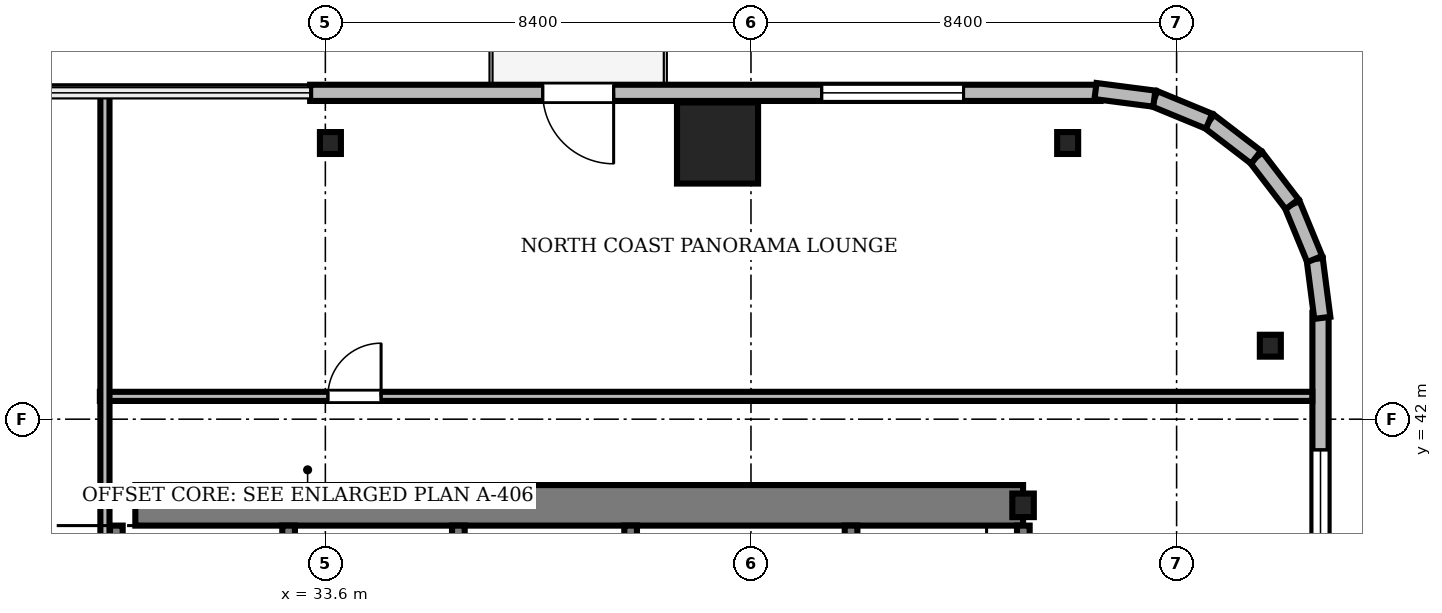
"""IFC4 building model, lengths in metres.
Left out: names, types, materials, properties, quantities, classifications, styles, units other than length and angle.
Written with IfcOpenShell. Run it as: python <this file> out.ifc"""

import sys

from ifc_helpers import new_model, si_unit, direction, frame, frame_2d, origin, origin_2d, place, context, subcontext, project, spatial, rectangle, i_section, extrude, source, transform, mapped, element, fill, save


model = new_model("IFC4")
c1 = context("Model", 3, precision=1e-05, world=origin(), true_north=direction((0.0, 1.0)))
c2 = subcontext(c1, "Body", "Model", "MODEL_VIEW")
j1 = project(units=[si_unit("LENGTHUNIT", "METRE"), si_unit("PLANEANGLEUNIT", "RADIAN")], contexts=[c1])
p1 = place(None, origin())
s1 = spatial("IfcSite", under=j1, at=p1, CompositionType="ELEMENT")
p2 = place(p1, origin())
s2 = spatial("IfcBuilding", under=s1, at=p2, CompositionType="ELEMENT")
p3 = place(p2, frame((0.0, 0.0, 126.1)))
s3 = spatial("IfcBuildingStorey", under=s2, at=p3, CompositionType="ELEMENT", Elevation=126.1)
m1 = source(origin(), c2, "Body", "SweptSolid", [
    extrude(rectangle(XDim=17.52, YDim=0.8, at=frame_2d((8.76, 0.0))), origin(), (0.0, 0.0, 1.0), 3.46),
])
p4 = place(p3, frame((29.85, 40.3, 0.0), z_axis=(0.0, 0.0, 1.0), x_axis=(1.0, 0.0, 0.0)))
e1 = element("IfcWall", 1, at=p4, inside=s3, PredefinedType="SHEAR", context=c2, shape_type="MappedRepresentation", body=[
    mapped(m1, transform((0.0, 0.0, 0.0), scale=1.0)),
])
m2 = source(origin(), c2, "Body", "SweptSolid", [
    extrude(i_section(OverallWidth=0.424, OverallDepth=0.465, WebThickness=0.035, FlangeThickness=0.056, FilletRadius=0.015, at=origin_2d()), origin(), (0.0, 0.0, 1.0), 3.46),
])
p5 = place(p3, frame((47.37, 40.3, 0.0), z_axis=(0.0, 0.0, 1.0), x_axis=(1.0, 0.0, 0.0)))
e2 = element("IfcColumn", 2, at=p5, inside=s3, PredefinedType="COLUMN", context=c2, shape_type="MappedRepresentation", body=[
    mapped(m2, transform((0.0, 0.0, 0.0), scale=1.0)),
])
m3 = source(origin(), c2, "Body", "SweptSolid", [
    extrude(rectangle(XDim=1.6, YDim=1.6, at=origin_2d()), origin(), (0.0, 0.0, 1.0), 3.46),
])
p6 = place(p3, frame((41.34, 47.45, 0.0), z_axis=(0.0, 0.0, 1.0), x_axis=(1.0, 0.0, 0.0)))
e3 = element("IfcColumn", 3, at=p6, inside=s3, PredefinedType="COLUMN", context=c2, shape_type="MappedRepresentation", body=[
    mapped(m3, transform((0.0, 0.0, 0.0), scale=1.0)),
])
m4 = source(origin(), c2, "Body", "SweptSolid", [
    extrude(i_section(OverallWidth=0.414, OverallDepth=0.432, WebThickness=0.026, FlangeThickness=0.04, FilletRadius=0.015, at=origin_2d()), origin(), (0.0, 0.0, 1.0), 3.46),
])
for number, where, z_axis, x_axis in (
    (4, (52.25, 43.45, 0.0), (0.0, 0.0, 1.0), (1.0, 0.0, 0.0)),
    (5, (48.25, 47.45, 0.0), (0.0, 0.0, 1.0), (1.0, 0.0, 0.0)),
    (6, (33.7, 47.45, 0.0), (0.0, 0.0, 1.0), (1.0, 0.0, 0.0)),
):
    element("IfcColumn", number, at=place(p3, frame(where, z_axis=z_axis, x_axis=x_axis)), inside=s3, PredefinedType="COLUMN", context=c2, shape_type="MappedRepresentation", body=[
        mapped(m4, transform((0.0, 0.0, 0.0), scale=1.0)),
    ])
m5 = source(origin(), c2, "Body", "SweptSolid", [
    extrude(rectangle(XDim=15.6, YDim=0.32, at=frame_2d((7.8, 0.0))), origin(), (0.0, 0.0, 1.0), 3.46),
])
p7 = place(p3, frame((48.9, 48.44, 0.0), z_axis=(0.0, 0.0, 1.0), x_axis=(-1.0, 0.0, 0.0)))
e7 = element("IfcWall", 7, at=p7, inside=s3, PredefinedType="SOLIDWALL", context=c2, shape_type="MappedRepresentation", body=[
    mapped(m5, transform((0.0, 0.0, 0.0), scale=1.0)),
])
m6 = source(origin(), c2, "Body", "SweptSolid", [
    extrude(rectangle(XDim=1.4, YDim=2.3, at=frame_2d((0.7, 1.15))), frame((0.0, 0.17, 0.0), z_axis=(0.0, -1.0, 0.0), x_axis=(1.0, 0.0, 0.0)), (0.0, 0.0, 1.0), 0.34),
])
p8 = place(p7, frame((9.61, 0.0, 0.0)))
e8 = element("IfcOpeningElement", 8, at=p8, cuts=e7, PredefinedType="OPENING", context=c2, shape_type="MappedRepresentation", body=[
    mapped(m6, transform((0.0, 0.0, 0.0), scale=1.0)),
])
m7 = source(origin(), c2, "Body", "SweptSolid", [
    extrude(rectangle(XDim=2.8, YDim=2.4, at=frame_2d((1.4, 1.2))), frame((0.0, 0.17, 0.0), z_axis=(0.0, -1.0, 0.0), x_axis=(1.0, 0.0, 0.0)), (0.0, 0.0, 1.0), 0.34),
])
p9 = place(p7, frame((2.705, 0.0, 0.72)))
e9 = element("IfcOpeningElement", 9, at=p9, cuts=e7, PredefinedType="OPENING", context=c2, shape_type="MappedRepresentation", body=[
    mapped(m7, transform((0.0, 0.0, 0.0), scale=1.0)),
])
m8 = source(origin(), c2, "Body", "SweptSolid", [
    extrude(rectangle(XDim=15.6, YDim=0.32, at=frame_2d((7.8, 0.0))), origin(), (0.0, 0.0, 1.0), 3.46),
])
p10 = place(p3, frame((53.24, 28.5, 0.0), z_axis=(0.0, 0.0, 1.0), x_axis=(0.0, 1.0, 0.0)))
e10 = element("IfcWall", 10, at=p10, inside=s3, PredefinedType="SOLIDWALL", context=c2, shape_type="MappedRepresentation", body=[
    mapped(m8, transform((0.0, 0.0, 0.0), scale=1.0)),
])
p11 = place(p10, frame((10.095, 0.0, 0.72)))
e11 = element("IfcOpeningElement", 11, at=p11, cuts=e10, PredefinedType="OPENING", context=c2, shape_type="MappedRepresentation", body=[
    mapped(m7, transform((0.0, 0.0, 0.0), scale=1.0)),
])
m9 = source(origin(), c2, "Body", "SweptSolid", [
    extrude(rectangle(XDim=1.17, YDim=0.32, at=frame_2d((0.585, 0.0))), origin(), (0.0, 0.0, 1.0), 3.46),
])
p12 = place(p3, frame((53.276, 44.0, 0.0), z_axis=(0.0, 0.0, 1.0), x_axis=(-0.128295670475, 0.991735963317, 0.0)))
e12 = element("IfcWall", 12, at=p12, inside=s3, PredefinedType="SOLIDWALL", context=c2, shape_type="MappedRepresentation", body=[
    mapped(m9, transform((0.0, 0.0, 0.0), scale=1.0)),
])
m10 = source(origin(), c2, "Body", "SweptSolid", [
    extrude(rectangle(XDim=1.169, YDim=0.32, at=frame_2d((0.584, 0.0))), origin(), (0.0, 0.0, 1.0), 3.46),
])
p13 = place(p3, frame((53.125, 45.16, 0.0), z_axis=(0.0, 0.0, 1.0), x_axis=(-0.381054331552, 0.924552646638, 0.0)))
e13 = element("IfcWall", 13, at=p13, inside=s3, PredefinedType="SOLIDWALL", context=c2, shape_type="MappedRepresentation", body=[
    mapped(m10, transform((0.0, 0.0, 0.0), scale=1.0)),
])
m11 = source(origin(), c2, "Body", "SweptSolid", [
    extrude(rectangle(XDim=1.169, YDim=0.32, at=frame_2d((0.584, 0.0))), origin(), (0.0, 0.0, 1.0), 3.46),
])
p14 = place(p3, frame((52.68, 46.241, 0.0), z_axis=(0.0, 0.0, 1.0), x_axis=(-0.608387696831, 0.793639975269, 0.0)))
e14 = element("IfcWall", 14, at=p14, inside=s3, PredefinedType="SOLIDWALL", context=c2, shape_type="MappedRepresentation", body=[
    mapped(m11, transform((0.0, 0.0, 0.0), scale=1.0)),
])
m12 = source(origin(), c2, "Body", "SweptSolid", [
    extrude(rectangle(XDim=1.169, YDim=0.32, at=frame_2d((0.584, 0.0))), origin(), (0.0, 0.0, 1.0), 3.46),
])
p15 = place(p3, frame((51.969, 47.169, 0.0), z_axis=(0.0, 0.0, 1.0), x_axis=(-0.793663520347, 0.608356981114, 0.0)))
e15 = element("IfcWall", 15, at=p15, inside=s3, PredefinedType="SOLIDWALL", context=c2, shape_type="MappedRepresentation", body=[
    mapped(m12, transform((0.0, 0.0, 0.0), scale=1.0)),
])
p16 = place(p3, frame((51.041, 47.88, 0.0), z_axis=(0.0, 0.0, 1.0), x_axis=(-0.924552646638, 0.381054331552, 0.0)))
e16 = element("IfcWall", 16, at=p16, inside=s3, PredefinedType="SOLIDWALL", context=c2, shape_type="MappedRepresentation", body=[
    mapped(m10, transform((0.0, 0.0, 0.0), scale=1.0)),
])
p17 = place(p3, frame((49.96, 48.325, 0.0), z_axis=(0.0, 0.0, 1.0), x_axis=(-0.991735963317, 0.128295670475, 0.0)))
e17 = element("IfcWall", 17, at=p17, inside=s3, PredefinedType="SOLIDWALL", context=c2, shape_type="MappedRepresentation", body=[
    mapped(m9, transform((0.0, 0.0, 0.0), scale=1.0)),
])
m13 = source(origin(), c2, "Body", "SweptSolid", [
    extrude(rectangle(XDim=9.25, YDim=0.25, at=frame_2d((4.625, 0.0))), origin(), (0.0, 0.0, 1.0), 3.5),
])
for number, where, z_axis, x_axis in (
    (18, (29.475, 30.65, 0.0), (0.0, 0.0, 1.0), (0.0, 1.0, 0.0)),
    (19, (32.875, 30.65, 0.0), (0.0, 0.0, 1.0), (0.0, 1.0, 0.0)),
    (20, (36.225, 30.65, 0.0), (0.0, 0.0, 1.0), (0.0, 1.0, 0.0)),
    (21, (39.625, 30.65, 0.0), (0.0, 0.0, 1.0), (0.0, 1.0, 0.0)),
    (22, (43.975, 30.65, 0.0), (0.0, 0.0, 1.0), (0.0, 1.0, 0.0)),
    (23, (47.375, 30.65, 0.0), (0.0, 0.0, 1.0), (0.0, 1.0, 0.0)),
):
    element("IfcWall", number, at=place(p3, frame(where, z_axis=z_axis, x_axis=x_axis)), inside=s3, PredefinedType="SOLIDWALL", context=c2, shape_type="MappedRepresentation", body=[
        mapped(m13, transform((0.0, 0.0, 0.0), scale=1.0)),
    ])
m14 = source(origin(), c2, "Body", "SweptSolid", [
    extrude(rectangle(XDim=23.928, YDim=0.18, at=frame_2d((11.964, 0.0))), origin(), (0.0, 0.0, 1.0), 2.702),
])
p18 = place(p3, frame((29.15, 42.45, 0.0), z_axis=(0.0, 0.0, 1.0), x_axis=(1.0, 0.0, 0.0)))
e24 = element("IfcWall", 24, at=p18, inside=s3, PredefinedType="PARTITIONING", context=c2, shape_type="MappedRepresentation", body=[
    mapped(m14, transform((0.0, 0.0, 0.0), scale=1.0)),
])
m15 = source(origin(), c2, "Body", "SweptSolid", [
    extrude(rectangle(XDim=1.05, YDim=2.2, at=frame_2d((0.525, 1.1))), frame((0.0, 0.1, 0.0), z_axis=(0.0, -1.0, 0.0), x_axis=(1.0, 0.0, 0.0)), (0.0, 0.0, 1.0), 0.2),
])
p19 = place(p18, frame((4.5, 0.0, 0.0)))
e25 = element("IfcOpeningElement", 25, at=p19, cuts=e24, PredefinedType="OPENING", context=c2, shape_type="MappedRepresentation", body=[
    mapped(m15, transform((0.0, 0.0, 0.0), scale=1.0)),
])
m16 = source(origin(), c2, "Body", "SweptSolid", [
    extrude(rectangle(XDim=11.45, YDim=0.18, at=frame_2d((5.725, 0.0))), origin(), (0.0, 0.0, 1.0), 2.702),
])
p20 = place(p3, frame((29.25, 37.02, 0.0), z_axis=(0.0, 0.0, 1.0), x_axis=(0.0, 1.0, 0.0)))
e26 = element("IfcWall", 26, at=p20, inside=s3, PredefinedType="PARTITIONING", context=c2, shape_type="MappedRepresentation", body=[
    mapped(m16, transform((0.0, 0.0, 0.0), scale=1.0)),
])
m17 = source(origin(), c2, "Body", "SweptSolid", [
    extrude(rectangle(XDim=1.4, YDim=2.3, at=frame_2d((0.7, 1.15))), frame((0.0, 0.025, 0.0), z_axis=(0.0, -1.0, 0.0), x_axis=(1.0, 0.0, 0.0)), (0.0, 0.0, 1.0), 0.05),
])
p21 = place(p8, frame((1.4, 0.0, 0.0), z_axis=(0.0, 0.0, 1.0), x_axis=(-1.0, 0.0, 0.0)))
e27 = element("IfcDoor", 27, at=p21, inside=s3, OperationType="DOUBLE_DOOR_SLIDING", PredefinedType="DOOR", context=c2, shape_type="MappedRepresentation", body=[
    mapped(m17, transform((0.0, 0.0, 0.0), scale=1.0)),
])
fill(e8, e27)
m18 = source(origin(), c2, "Body", "SweptSolid", [
    extrude(rectangle(XDim=2.8, YDim=2.4, at=frame_2d((1.4, 1.2))), frame((0.0, 0.03, 0.0), z_axis=(0.0, -1.0, 0.0), x_axis=(1.0, 0.0, 0.0)), (0.0, 0.0, 1.0), 0.06),
])
p22 = place(p9, origin())
e28 = element("IfcWindow", 28, at=p22, inside=s3, PartitioningType="SINGLE_PANEL", PredefinedType="WINDOW", context=c2, shape_type="MappedRepresentation", body=[
    mapped(m18, transform((0.0, 0.0, 0.0), scale=1.0)),
])
fill(e9, e28)
p23 = place(p11, origin())
e29 = element("IfcWindow", 29, at=p23, inside=s3, PartitioningType="SINGLE_PANEL", PredefinedType="WINDOW", context=c2, shape_type="MappedRepresentation", body=[
    mapped(m18, transform((0.0, 0.0, 0.0), scale=1.0)),
])
fill(e11, e29)
m19 = source(origin(), c2, "Body", "SweptSolid", [
    extrude(rectangle(XDim=1.05, YDim=2.2, at=frame_2d((0.525, 1.1))), frame((0.0, 0.025, 0.0), z_axis=(0.0, -1.0, 0.0), x_axis=(1.0, 0.0, 0.0)), (0.0, 0.0, 1.0), 0.05),
])
p24 = place(p19, origin())
e30 = element("IfcDoor", 30, at=p24, inside=s3, OperationType="SINGLE_SWING_RIGHT", PredefinedType="DOOR", context=c2, shape_type="MappedRepresentation", body=[
    mapped(m19, transform((0.0, 0.0, 0.0), scale=1.0)),
])
fill(e25, e30)
save(model, sys.argv[1])
